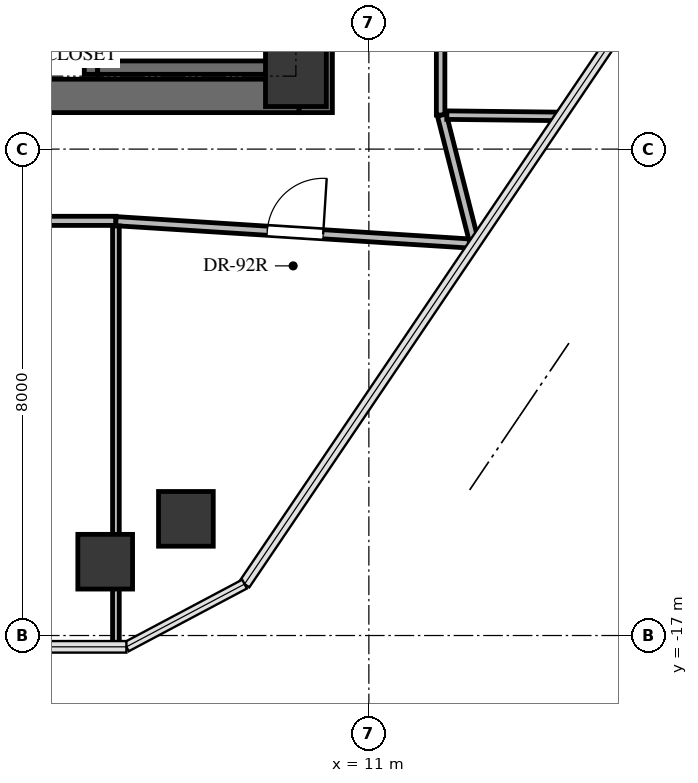
"""IFC4 building model, lengths in metres.
Left out: names, types, materials, properties, quantities, classifications, styles, units other than length and angle.
Written with IfcOpenShell. Run it as: python <this file> out.ifc"""

import sys

from ifc_helpers import new_model, si_unit, direction, frame, frame_2d, origin, origin_2d, place, context, subcontext, project, spatial, rectangle, extrude, source, transform, mapped, element, fill, save


model = new_model("IFC4")
c1 = context("Model", 3, precision=1e-05, world=origin(), true_north=direction((0.0, 1.0)))
c2 = subcontext(c1, "Body", "Model", "MODEL_VIEW")
j1 = project(units=[si_unit("LENGTHUNIT", "METRE"), si_unit("PLANEANGLEUNIT", "RADIAN")], contexts=[c1])
p1 = place(None, origin())
s1 = spatial("IfcSite", under=j1, at=p1, CompositionType="ELEMENT")
p2 = place(p1, origin())
s2 = spatial("IfcBuilding", under=s1, at=p2, CompositionType="ELEMENT")
p3 = place(p2, frame((0.0, 0.0, 248.0)))
s3 = spatial("IfcBuildingStorey", under=s2, at=p3, CompositionType="ELEMENT", Elevation=248.0)
p4 = place(p3, frame((10.125, -8.4, 0.0), z_axis=(0.0, 0.0, 1.0), x_axis=(0.0, 1.0, 0.0)))
e1 = element("IfcWall", 1, at=p4, inside=s3, PredefinedType="SHEAR", context=c2, shape_type="SweptSolid", body=[
    extrude(rectangle(XDim=16.8, YDim=0.55, at=frame_2d((8.4, 0.0))), origin(), (0.0, 0.0, 1.0), 3.3),
])
p5 = place(p3, frame((2.1, -8.125, 0.0), z_axis=(0.0, 0.0, 1.0), x_axis=(1.0, 0.0, 0.0)))
e2 = element("IfcWall", 2, at=p5, inside=s3, PredefinedType="SHEAR", context=c2, shape_type="SweptSolid", body=[
    extrude(rectangle(XDim=7.75, YDim=0.55, at=frame_2d((3.875, 0.0))), origin(), (0.0, 0.0, 1.0), 3.3),
])
p6 = place(p3, frame((9.61, -7.77, -0.24), z_axis=(0.0, 0.0, 1.0), x_axis=(0.0, 1.0, 0.0)))
e3 = element("IfcWall", 3, at=p6, inside=s3, PredefinedType="SHEAR", context=c2, shape_type="SweptSolid", body=[
    extrude(rectangle(XDim=7.89, YDim=0.22, at=frame_2d((3.945, 0.0))), origin(), (0.0, 0.0, 1.0), 3.3),
])
p7 = place(p3, frame((6.43, 0.12, -0.24), z_axis=(0.0, 0.0, 1.0), x_axis=(0.0, -1.0, 0.0)))
e4 = element("IfcWall", 4, at=p7, inside=s3, PredefinedType="SHEAR", context=c2, shape_type="SweptSolid", body=[
    extrude(rectangle(XDim=7.89, YDim=0.22, at=frame_2d((3.945, 0.0))), origin(), (0.0, 0.0, 1.0), 3.3),
])
p8 = place(p7, frame((0.52, 0.0, 0.0)))
e5 = element("IfcOpeningElement", 5, at=p8, cuts=e4, PredefinedType="OPENING", context=c2, shape_type="SweptSolid", body=[
    extrude(rectangle(XDim=1.05, YDim=2.15, at=frame_2d((0.525, 1.075))), frame((0.0, 0.12, 0.0), z_axis=(0.0, -1.0, 0.0), x_axis=(1.0, 0.0, 0.0)), (0.0, 0.0, 1.0), 0.24),
])
p9 = place(p3, frame((6.54, -7.66, -0.24), z_axis=(0.0, 0.0, 1.0), x_axis=(1.0, 0.0, 0.0)))
e6 = element("IfcWall", 6, at=p9, inside=s3, PredefinedType="SHEAR", context=c2, shape_type="SweptSolid", body=[
    extrude(rectangle(XDim=2.96, YDim=0.22, at=frame_2d((1.48, 0.0))), origin(), (0.0, 0.0, 1.0), 3.3),
])
m1 = source(origin(), c2, "Body", "SweptSolid", [
    extrude(rectangle(XDim=1.0, YDim=1.0, at=origin_2d()), origin(), (0.0, 0.0, 1.0), 3.3),
])
p10 = place(p3, frame((9.8, -7.8, -0.24), z_axis=(0.0, 0.0, 1.0), x_axis=(1.0, 0.0, 0.0)))
e7 = element("IfcColumn", 7, at=p10, inside=s3, PredefinedType="COLUMN", context=c2, shape_type="MappedRepresentation", body=[
    mapped(m1, transform((0.0, 0.0, 0.0), x_axis=(1.0, 0.0, 0.0), y_axis=(0.0, 1.0, 0.0), z_axis=(0.0, 0.0, 1.0), scale=1.0)),
])
m2 = source(origin(), c2, "Body", "SweptSolid", [
    extrude(rectangle(XDim=0.9, YDim=0.9, at=origin_2d()), origin(), (0.0, 0.0, 1.0), 3.3),
])
for number, where, z_axis, x_axis in (
    (8, (7.991, -15.081, -0.24), (0.0, 0.0, 1.0), (1.0, 0.0, 0.0)),
    (9, (6.664, -15.786, -0.24), (0.0, 0.0, 1.0), (1.0, 0.0, 0.0)),
):
    element("IfcColumn", number, at=place(p3, frame(where, z_axis=z_axis, x_axis=x_axis)), inside=s3, PredefinedType="COLUMN", context=c2, shape_type="MappedRepresentation", body=[
        mapped(m2, transform((0.0, 0.0, 0.0), x_axis=(1.0, 0.0, 0.0), y_axis=(0.0, 1.0, 0.0), z_axis=(0.0, 0.0, 1.0), scale=1.0)),
    ])
p11 = place(p3, frame((12.18, -8.44, 0.0), z_axis=(0.0, 0.0, 1.0), x_axis=(0.0, 1.0, 0.0)))
e10 = element("IfcWall", 10, at=p11, inside=s3, PredefinedType="PARTITIONING", context=c2, shape_type="SweptSolid", body=[
    extrude(rectangle(XDim=3.48, YDim=0.14, at=frame_2d((1.74, 0.0))), origin(), (0.0, 0.0, 1.0), 2.399),
])
p12 = place(p11, frame((1.29, 0.0, 0.0)))
e11 = element("IfcOpeningElement", 11, at=p12, cuts=e10, PredefinedType="OPENING", context=c2, shape_type="SweptSolid", body=[
    extrude(rectangle(XDim=0.9, YDim=2.05, at=frame_2d((0.45, 1.025))), frame((0.0, 0.08, 0.0), z_axis=(0.0, -1.0, 0.0), x_axis=(1.0, 0.0, 0.0)), (0.0, 0.0, 1.0), 0.16),
])
p13 = place(p3, frame((2.84, -10.18, 0.0), z_axis=(0.0, 0.0, 1.0), x_axis=(1.0, 0.0, 0.0)))
e12 = element("IfcWall", 12, at=p13, inside=s3, PredefinedType="PARTITIONING", context=c2, shape_type="SweptSolid", body=[
    extrude(rectangle(XDim=4.0, YDim=0.15, at=frame_2d((2.0, 0.0))), origin(), (0.0, 0.0, 1.0), 2.301),
])
p14 = place(p13, frame((1.2, 0.0, 0.0)))
e13 = element("IfcOpeningElement", 13, at=p14, cuts=e12, PredefinedType="OPENING", context=c2, shape_type="SweptSolid", body=[
    extrude(rectangle(XDim=1.6, YDim=2.15, at=frame_2d((0.8, 1.075))), frame((0.0, 0.085, 0.0), z_axis=(0.0, -1.0, 0.0), x_axis=(1.0, 0.0, 0.0)), (0.0, 0.0, 1.0), 0.17),
])
p15 = place(p3, frame((6.84, -10.185, 0.0), z_axis=(0.0, 0.0, 1.0), x_axis=(0.99800894273, -0.063072579072, 0.0)))
e14 = element("IfcWall", 14, at=p15, inside=s3, PredefinedType="PARTITIONING", context=c2, shape_type="SweptSolid", body=[
    extrude(rectangle(XDim=5.911, YDim=0.15, at=frame_2d((2.955, 0.0))), origin(), (0.0, 0.0, 1.0), 2.399),
])
p16 = place(p15, frame((2.495, 0.0, 0.0)))
e15 = element("IfcOpeningElement", 15, at=p16, cuts=e14, PredefinedType="OPENING", context=c2, shape_type="SweptSolid", body=[
    extrude(rectangle(XDim=0.92, YDim=2.1, at=frame_2d((0.46, 1.05))), frame((0.0, 0.085, 0.0), z_axis=(0.0, -1.0, 0.0), x_axis=(1.0, 0.0, 0.0)), (0.0, 0.0, 1.0), 0.17),
])
p17 = place(p3, frame((12.719, -10.477, 0.0), z_axis=(0.0, 0.0, 1.0), x_axis=(-0.246550381988, 0.96912997536, 0.0)))
e16 = element("IfcWall", 16, at=p17, inside=s3, PredefinedType="PARTITIONING", context=c2, shape_type="SweptSolid", body=[
    extrude(rectangle(XDim=2.102, YDim=0.15, at=frame_2d((1.051, 0.0))), origin(), (0.0, 0.0, 1.0), 2.399),
])
p18 = place(p3, frame((14.156, -8.462, 0.0), z_axis=(0.0, 0.0, 1.0), x_axis=(-0.999935742613, 0.011336253532, 0.0)))
e17 = element("IfcWall", 17, at=p18, inside=s3, PredefinedType="PARTITIONING", context=c2, shape_type="SweptSolid", body=[
    extrude(rectangle(XDim=1.874, YDim=0.14, at=frame_2d((0.937, 0.0))), origin(), (0.0, 0.0, 1.0), 2.399),
])
p19 = place(p3, frame((6.84, -10.264, 0.0), z_axis=(0.0, 0.0, 1.0), x_axis=(0.0, -1.0, 0.0)))
e18 = element("IfcWall", 18, at=p19, inside=s3, PredefinedType="MOVABLE", context=c2, shape_type="SweptSolid", body=[
    extrude(rectangle(XDim=5.606, YDim=0.11, at=frame_2d((2.803, 0.0))), origin(), (0.0, 0.0, 1.0), 2.301),
])
p20 = place(p3, frame((6.84, -15.87, 0.0), z_axis=(0.0, 0.0, 1.0), x_axis=(0.0, -1.0, 0.0)))
e19 = element("IfcWall", 19, at=p20, inside=s3, PredefinedType="MOVABLE", context=c2, shape_type="SweptSolid", body=[
    extrude(rectangle(XDim=1.316, YDim=0.11, at=frame_2d((0.658, 0.0))), origin(), (0.0, 0.0, 1.0), 1.877),
])
m3 = source(origin(), c2, "Body", "SweptSolid", [
    extrude(rectangle(XDim=0.92, YDim=2.1, at=frame_2d((0.46, 1.05))), frame((0.0, 0.025, 0.0), z_axis=(0.0, -1.0, 0.0), x_axis=(1.0, 0.0, 0.0)), (0.0, 0.0, 1.0), 0.05),
])
p21 = place(p16, origin())
e20 = element("IfcDoor", 20, at=p21, inside=s3, OperationType="SINGLE_SWING_RIGHT", PredefinedType="DOOR", context=c2, shape_type="MappedRepresentation", body=[
    mapped(m3, transform((0.0, 0.0, 0.0), x_axis=(1.0, 0.0, 0.0), y_axis=(0.0, 1.0, 0.0), z_axis=(0.0, 0.0, 1.0), scale=1.0)),
])
fill(e15, e20)
save(model, sys.argv[1])
